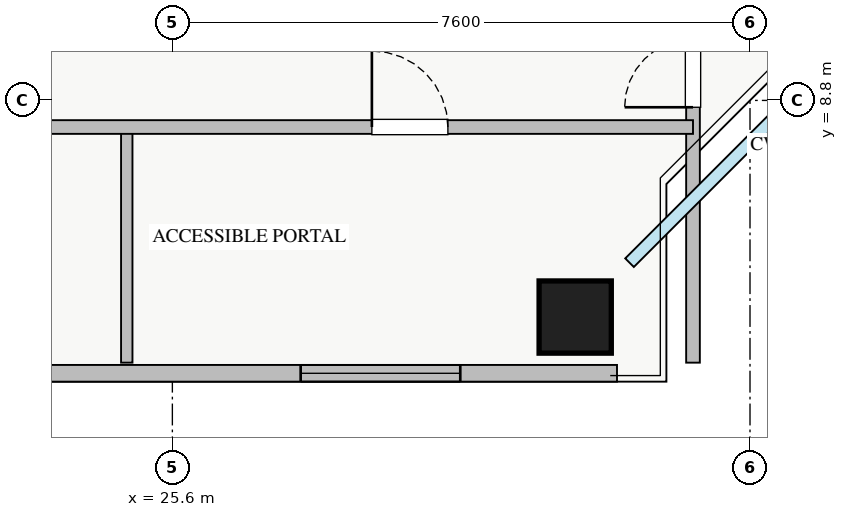
"""IFC4 building model, lengths in metres.
Left out: names, types, materials, properties, quantities, classifications, styles, units other than length and angle.
Written with IfcOpenShell. Run it as: python <this file> out.ifc"""

import sys

from ifc_helpers import new_model, si_unit, direction, frame, frame_2d, origin, origin_2d, place, context, subcontext, project, spatial, rectangle, extrude, source, transform, mapped, element, fill, save


model = new_model("IFC4")
c1 = context("Model", 3, precision=1e-05, world=origin(), true_north=direction((0.0, 1.0)))
c2 = subcontext(c1, "Body", "Model", "MODEL_VIEW")
j1 = project(units=[si_unit("LENGTHUNIT", "METRE"), si_unit("PLANEANGLEUNIT", "RADIAN")], contexts=[c1])
p1 = place(None, origin())
s1 = spatial("IfcSite", under=j1, at=p1, CompositionType="ELEMENT")
p2 = place(p1, origin())
s2 = spatial("IfcBuilding", under=s1, at=p2, CompositionType="ELEMENT")
p3 = place(p2, frame((0.0, 0.0, 153.5)))
s3 = spatial("IfcBuildingStorey", under=s2, at=p3, CompositionType="ELEMENT", Elevation=153.5)
m1 = source(origin(), c2, "Body", "SweptSolid", [
    extrude(rectangle(XDim=0.95, YDim=0.95, at=origin_2d()), origin(), (0.0, 0.0, 1.0), 3.25),
])
p4 = place(p3, frame((30.9, 5.95, 0.0), z_axis=(0.0, 0.0, 1.0), x_axis=(1.0, 0.0, 0.0)))
e1 = element("IfcColumn", 1, at=p4, inside=s3, PredefinedType="COLUMN", context=c2, shape_type="MappedRepresentation", body=[
    mapped(m1, transform((0.0, 0.0, 0.0), x_axis=(1.0, 0.0, 0.0), y_axis=(0.0, 1.0, 0.0), z_axis=(0.0, 0.0, 1.0), scale=1.0)),
])
p5 = place(p3, frame((6.55, 5.21, 0.0), z_axis=(0.0, 0.0, 1.0), x_axis=(1.0, 0.0, 0.0)))
e2 = element("IfcWall", 2, at=p5, inside=s3, PredefinedType="STANDARD", context=c2, shape_type="SweptSolid", body=[
    extrude(rectangle(XDim=24.9, YDim=0.22, at=frame_2d((12.45, 0.0))), origin(), (0.0, 0.0, 1.0), 2.61),
])
p6 = place(p5, frame((0.3, 0.0, 0.9)))
e3 = element("IfcOpeningElement", 3, at=p6, cuts=e2, PredefinedType="OPENING", context=c2, shape_type="SweptSolid", body=[
    extrude(rectangle(XDim=1.5, YDim=1.5, at=frame_2d((0.75, 0.75))), frame((0.0, 0.12, 0.0), z_axis=(0.0, -1.0, 0.0), x_axis=(1.0, 0.0, 0.0)), (0.0, 0.0, 1.0), 0.24),
])
p7 = place(p5, frame((7.304, 0.0, 0.9)))
e4 = element("IfcOpeningElement", 4, at=p7, cuts=e2, PredefinedType="OPENING", context=c2, shape_type="SweptSolid", body=[
    extrude(rectangle(XDim=1.8, YDim=1.5, at=frame_2d((0.9, 0.75))), frame((0.0, 0.12, 0.0), z_axis=(0.0, -1.0, 0.0), x_axis=(1.0, 0.0, 0.0)), (0.0, 0.0, 1.0), 0.24),
])
p8 = place(p5, frame((14.813, 0.0, 0.9)))
e5 = element("IfcOpeningElement", 5, at=p8, cuts=e2, PredefinedType="OPENING", context=c2, shape_type="SweptSolid", body=[
    extrude(rectangle(XDim=1.5, YDim=1.45, at=frame_2d((0.75, 0.725))), frame((0.0, 0.12, 0.0), z_axis=(0.0, -1.0, 0.0), x_axis=(1.0, 0.0, 0.0)), (0.0, 0.0, 1.0), 0.24),
])
p9 = place(p5, frame((20.738, 0.0, 0.9)))
e6 = element("IfcOpeningElement", 6, at=p9, cuts=e2, PredefinedType="OPENING", context=c2, shape_type="SweptSolid", body=[
    extrude(rectangle(XDim=2.1, YDim=1.48, at=frame_2d((1.05, 0.74))), frame((0.0, 0.12, 0.0), z_axis=(0.0, -1.0, 0.0), x_axis=(1.0, 0.0, 0.0)), (0.0, 0.0, 1.0), 0.24),
])
p10 = place(p5, frame((4.094, 0.0, 0.9)))
e7 = element("IfcOpeningElement", 7, at=p10, cuts=e2, PredefinedType="OPENING", context=c2, shape_type="SweptSolid", body=[
    extrude(rectangle(XDim=2.4, YDim=1.5, at=frame_2d((1.2, 0.75))), frame((0.0, 0.12, 0.0), z_axis=(0.0, -1.0, 0.0), x_axis=(1.0, 0.0, 0.0)), (0.0, 0.0, 1.0), 0.24),
])
p11 = place(p3, frame((32.45, 5.35, 0.0), z_axis=(0.0, 0.0, 1.0), x_axis=(0.0, 1.0, 0.0)))
e8 = element("IfcWall", 8, at=p11, inside=s3, PredefinedType="PARTITIONING", context=c2, shape_type="SweptSolid", body=[
    extrude(rectangle(XDim=11.35, YDim=0.18, at=frame_2d((5.675, 0.0))), origin(), (0.0, 0.0, 1.0), 3.07),
])
p12 = place(p11, frame((3.36, 0.0, 0.0)))
e9 = element("IfcOpeningElement", 9, at=p12, cuts=e8, PredefinedType="OPENING", context=c2, shape_type="SweptSolid", body=[
    extrude(rectangle(XDim=0.9, YDim=2.05, at=frame_2d((0.45, 1.025))), frame((0.0, 0.1, 0.0), z_axis=(0.0, -1.0, 0.0), x_axis=(1.0, 0.0, 0.0)), (0.0, 0.0, 1.0), 0.2),
])
p13 = place(p11, frame((5.785, 0.0, 0.0)))
e10 = element("IfcOpeningElement", 10, at=p13, cuts=e8, PredefinedType="OPENING", context=c2, shape_type="SweptSolid", body=[
    extrude(rectangle(XDim=1.0, YDim=2.05, at=frame_2d((0.5, 1.025))), frame((0.0, 0.1, 0.0), z_axis=(0.0, -1.0, 0.0), x_axis=(1.0, 0.0, 0.0)), (0.0, 0.0, 1.0), 0.2),
])
p14 = place(p3, frame((25.0, 5.35, 0.0), z_axis=(0.0, 0.0, 1.0), x_axis=(0.0, 1.0, 0.0)))
e11 = element("IfcWall", 11, at=p14, inside=s3, PredefinedType="PARTITIONING", context=c2, shape_type="SweptSolid", body=[
    extrude(rectangle(XDim=3.1, YDim=0.15, at=frame_2d((1.55, 0.0))), origin(), (0.0, 0.0, 1.0), 3.07),
])
p15 = place(p3, frame((8.65, 8.45, 0.0), z_axis=(0.0, 0.0, 1.0), x_axis=(1.0, 0.0, 0.0)))
e12 = element("IfcWall", 12, at=p15, inside=s3, PredefinedType="PARTITIONING", context=c2, shape_type="SweptSolid", body=[
    extrude(rectangle(XDim=23.8, YDim=0.18, at=frame_2d((11.9, 0.0))), origin(), (0.0, 0.0, 1.0), 3.07),
])
p16 = place(p15, frame((3.425, 0.0, 0.0)))
e13 = element("IfcOpeningElement", 13, at=p16, cuts=e12, PredefinedType="OPENING", context=c2, shape_type="SweptSolid", body=[
    extrude(rectangle(XDim=1.0, YDim=2.05, at=frame_2d((0.5, 1.025))), frame((0.0, 0.1, 0.0), z_axis=(0.0, -1.0, 0.0), x_axis=(1.0, 0.0, 0.0)), (0.0, 0.0, 1.0), 0.2),
])
p17 = place(p15, frame((11.6, 0.0, 0.0)))
e14 = element("IfcOpeningElement", 14, at=p17, cuts=e12, PredefinedType="OPENING", context=c2, shape_type="SweptSolid", body=[
    extrude(rectangle(XDim=1.0, YDim=2.05, at=frame_2d((0.5, 1.025))), frame((0.0, 0.1, 0.0), z_axis=(0.0, -1.0, 0.0), x_axis=(1.0, 0.0, 0.0)), (0.0, 0.0, 1.0), 0.2),
])
p18 = place(p15, frame((19.575, 0.0, 0.0)))
e15 = element("IfcOpeningElement", 15, at=p18, cuts=e12, PredefinedType="OPENING", context=c2, shape_type="SweptSolid", body=[
    extrude(rectangle(XDim=1.0, YDim=2.05, at=frame_2d((0.5, 1.025))), frame((0.0, 0.1, 0.0), z_axis=(0.0, -1.0, 0.0), x_axis=(1.0, 0.0, 0.0)), (0.0, 0.0, 1.0), 0.2),
])
m2 = source(origin(), c2, "Body", "SweptSolid", [
    extrude(rectangle(XDim=2.1, YDim=1.48, at=frame_2d((1.05, 0.74))), frame((0.0, 0.03, 0.0), z_axis=(0.0, -1.0, 0.0), x_axis=(1.0, 0.0, 0.0)), (0.0, 0.0, 1.0), 0.06),
])
p19 = place(p9, origin())
e16 = element("IfcWindow", 16, at=p19, inside=s3, PartitioningType="TRIPLE_PANEL_VERTICAL", PredefinedType="WINDOW", context=c2, shape_type="MappedRepresentation", body=[
    mapped(m2, transform((0.0, 0.0, 0.0), x_axis=(1.0, 0.0, 0.0), y_axis=(0.0, 1.0, 0.0), z_axis=(0.0, 0.0, 1.0), scale=1.0)),
])
fill(e6, e16)
m3 = source(origin(), c2, "Body", "SweptSolid", [
    extrude(rectangle(XDim=0.9, YDim=2.05, at=frame_2d((0.45, 1.025))), frame((0.0, 0.025, 0.0), z_axis=(0.0, -1.0, 0.0), x_axis=(1.0, 0.0, 0.0)), (0.0, 0.0, 1.0), 0.05),
])
p20 = place(p12, origin())
e17 = element("IfcDoor", 17, at=p20, inside=s3, OperationType="SINGLE_SWING_LEFT", PredefinedType="DOOR", context=c2, shape_type="MappedRepresentation", body=[
    mapped(m3, transform((0.0, 0.0, 0.0), x_axis=(1.0, 0.0, 0.0), y_axis=(0.0, 1.0, 0.0), z_axis=(0.0, 0.0, 1.0), scale=1.0)),
])
fill(e9, e17)
m4 = source(origin(), c2, "Body", "SweptSolid", [
    extrude(rectangle(XDim=1.0, YDim=2.05, at=frame_2d((0.5, 1.025))), frame((0.0, 0.025, 0.0), z_axis=(0.0, -1.0, 0.0), x_axis=(1.0, 0.0, 0.0)), (0.0, 0.0, 1.0), 0.05),
])
p21 = place(p18, origin())
e18 = element("IfcDoor", 18, at=p21, inside=s3, OperationType="SINGLE_SWING_LEFT", PredefinedType="DOOR", context=c2, shape_type="MappedRepresentation", body=[
    mapped(m4, transform((0.0, 0.0, 0.0), x_axis=(1.0, 0.0, 0.0), y_axis=(0.0, 1.0, 0.0), z_axis=(0.0, 0.0, 1.0), scale=1.0)),
])
fill(e15, e18)
save(model, sys.argv[1])
